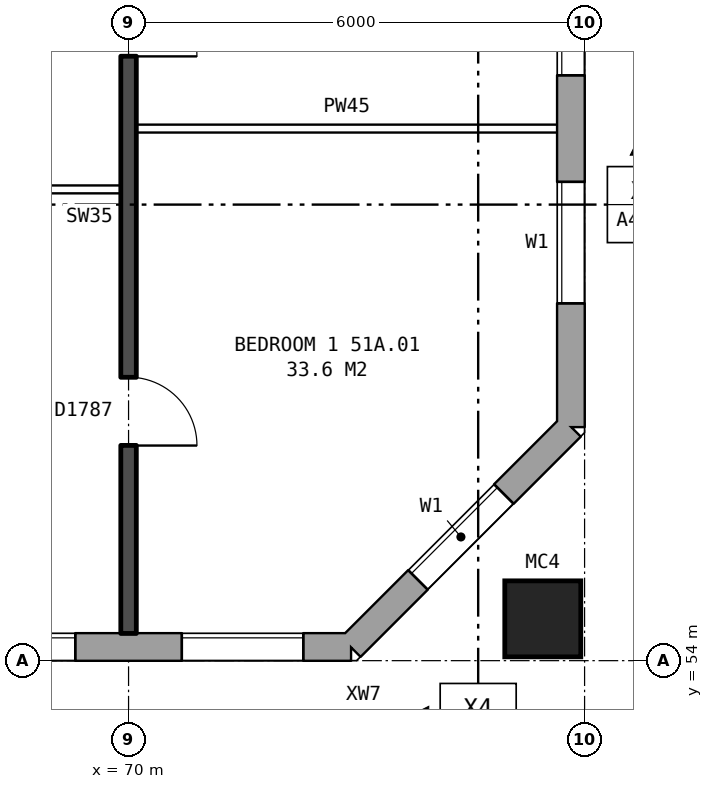
"""IFC4 building model, lengths in metres.
Left out: names, types, materials, properties, quantities, classifications, styles, units other than length and angle.
Written with IfcOpenShell. Run it as: python <this file> out.ifc"""

import sys

from ifc_helpers import new_model, si_unit, direction, frame, frame_2d, origin, origin_2d, place, context, subcontext, project, spatial, rectangle, hollow_rectangle, extrude, element, fill, save


model = new_model("IFC4")
c1 = context("Model", 3, precision=1e-05, world=origin(), true_north=direction((0.0, 1.0)))
c2 = subcontext(c1, "Body", "Model", "MODEL_VIEW")
j1 = project(units=[si_unit("LENGTHUNIT", "METRE"), si_unit("PLANEANGLEUNIT", "RADIAN")], contexts=[c1])
p1 = place(None, origin())
s1 = spatial("IfcSite", under=j1, at=p1, CompositionType="ELEMENT")
p2 = place(p1, origin())
s2 = spatial("IfcBuilding", under=s1, at=p2, CompositionType="ELEMENT")
p3 = place(p2, frame((0.0, 0.0, 182.0)))
s3 = spatial("IfcBuildingStorey", under=s2, at=p3, CompositionType="ELEMENT", Elevation=182.0)
p4 = place(p3, frame((75.45, 54.55, 0.0), z_axis=(0.0, 0.0, 1.0), x_axis=(1.0, 0.0, 0.0)))
e1 = element("IfcColumn", 1, at=p4, inside=s3, PredefinedType="COLUMN", context=c2, shape_type="SweptSolid", body=[
    extrude(hollow_rectangle(XDim=1.0, YDim=1.0, WallThickness=0.055, at=origin_2d()), origin(), (0.0, 0.0, 1.0), 3.1),
])
p5 = place(p3, frame((33.325, 54.18, 0.0), z_axis=(0.0, 0.0, 1.0), x_axis=(1.0, 0.0, 0.0)))
e2 = element("IfcWall", 2, at=p5, inside=s3, PredefinedType="STANDARD", context=c2, shape_type="SweptSolid", body=[
    extrude(rectangle(XDim=39.601, YDim=0.36, at=frame_2d((19.8, 0.0))), origin(), (0.0, 0.0, 1.0), 2.85),
])
p6 = place(p5, frame((1.375, 0.0, 0.8)))
e3 = element("IfcOpeningElement", 3, at=p6, cuts=e2, PredefinedType="OPENING", context=c2, shape_type="SweptSolid", body=[
    extrude(rectangle(XDim=1.6, YDim=1.8, at=frame_2d((0.8, 0.9))), frame((0.0, 0.19, 0.0), z_axis=(0.0, -1.0, 0.0), x_axis=(1.0, 0.0, 0.0)), (0.0, 0.0, 1.0), 0.38),
])
p7 = place(p5, frame((4.375, 0.0, 0.8)))
e4 = element("IfcOpeningElement", 4, at=p7, cuts=e2, PredefinedType="OPENING", context=c2, shape_type="SweptSolid", body=[
    extrude(rectangle(XDim=1.6, YDim=1.8, at=frame_2d((0.8, 0.9))), frame((0.0, 0.19, 0.0), z_axis=(0.0, -1.0, 0.0), x_axis=(1.0, 0.0, 0.0)), (0.0, 0.0, 1.0), 0.38),
])
p8 = place(p5, frame((6.875, 0.0, 0.8)))
e5 = element("IfcOpeningElement", 5, at=p8, cuts=e2, PredefinedType="OPENING", context=c2, shape_type="SweptSolid", body=[
    extrude(rectangle(XDim=1.0, YDim=1.8, at=frame_2d((0.5, 0.9))), frame((0.0, 0.19, 0.0), z_axis=(0.0, -1.0, 0.0), x_axis=(1.0, 0.0, 0.0)), (0.0, 0.0, 1.0), 0.38),
])
p9 = place(p5, frame((8.175, 0.0, 1.7)))
e6 = element("IfcOpeningElement", 6, at=p9, cuts=e2, PredefinedType="OPENING", context=c2, shape_type="SweptSolid", body=[
    extrude(rectangle(XDim=0.6, YDim=0.9, at=frame_2d((0.3, 0.45))), frame((0.0, 0.19, 0.0), z_axis=(0.0, -1.0, 0.0), x_axis=(1.0, 0.0, 0.0)), (0.0, 0.0, 1.0), 0.38),
])
p10 = place(p5, frame((13.375, 0.0, 0.8)))
e7 = element("IfcOpeningElement", 7, at=p10, cuts=e2, PredefinedType="OPENING", context=c2, shape_type="SweptSolid", body=[
    extrude(rectangle(XDim=1.6, YDim=1.8, at=frame_2d((0.8, 0.9))), frame((0.0, 0.19, 0.0), z_axis=(0.0, -1.0, 0.0), x_axis=(1.0, 0.0, 0.0)), (0.0, 0.0, 1.0), 0.38),
])
p11 = place(p5, frame((16.375, 0.0, 0.8)))
e8 = element("IfcOpeningElement", 8, at=p11, cuts=e2, PredefinedType="OPENING", context=c2, shape_type="SweptSolid", body=[
    extrude(rectangle(XDim=1.6, YDim=1.8, at=frame_2d((0.8, 0.9))), frame((0.0, 0.19, 0.0), z_axis=(0.0, -1.0, 0.0), x_axis=(1.0, 0.0, 0.0)), (0.0, 0.0, 1.0), 0.38),
])
p12 = place(p5, frame((19.375, 0.0, 0.8)))
e9 = element("IfcOpeningElement", 9, at=p12, cuts=e2, PredefinedType="OPENING", context=c2, shape_type="SweptSolid", body=[
    extrude(rectangle(XDim=1.6, YDim=1.8, at=frame_2d((0.8, 0.9))), frame((0.0, 0.19, 0.0), z_axis=(0.0, -1.0, 0.0), x_axis=(1.0, 0.0, 0.0)), (0.0, 0.0, 1.0), 0.38),
])
p13 = place(p5, frame((22.375, 0.0, 0.8)))
e10 = element("IfcOpeningElement", 10, at=p13, cuts=e2, PredefinedType="OPENING", context=c2, shape_type="SweptSolid", body=[
    extrude(rectangle(XDim=1.6, YDim=1.8, at=frame_2d((0.8, 0.9))), frame((0.0, 0.19, 0.0), z_axis=(0.0, -1.0, 0.0), x_axis=(1.0, 0.0, 0.0)), (0.0, 0.0, 1.0), 0.38),
])
p14 = place(p5, frame((25.375, 0.0, 0.8)))
e11 = element("IfcOpeningElement", 11, at=p14, cuts=e2, PredefinedType="OPENING", context=c2, shape_type="SweptSolid", body=[
    extrude(rectangle(XDim=1.6, YDim=1.8, at=frame_2d((0.8, 0.9))), frame((0.0, 0.19, 0.0), z_axis=(0.0, -1.0, 0.0), x_axis=(1.0, 0.0, 0.0)), (0.0, 0.0, 1.0), 0.38),
])
p15 = place(p5, frame((27.825, 0.0, 0.35)))
e12 = element("IfcOpeningElement", 12, at=p15, cuts=e2, PredefinedType="OPENING", context=c2, shape_type="SweptSolid", body=[
    extrude(rectangle(XDim=1.4, YDim=1.8, at=frame_2d((0.7, 0.9))), frame((0.0, 0.19, 0.0), z_axis=(0.0, -1.0, 0.0), x_axis=(1.0, 0.0, 0.0)), (0.0, 0.0, 1.0), 0.38),
])
p16 = place(p5, frame((31.375, 0.0, 0.8)))
e13 = element("IfcOpeningElement", 13, at=p16, cuts=e2, PredefinedType="OPENING", context=c2, shape_type="SweptSolid", body=[
    extrude(rectangle(XDim=1.6, YDim=1.8, at=frame_2d((0.8, 0.9))), frame((0.0, 0.19, 0.0), z_axis=(0.0, -1.0, 0.0), x_axis=(1.0, 0.0, 0.0)), (0.0, 0.0, 1.0), 0.38),
])
p17 = place(p5, frame((34.375, 0.0, 0.8)))
e14 = element("IfcOpeningElement", 14, at=p17, cuts=e2, PredefinedType="OPENING", context=c2, shape_type="SweptSolid", body=[
    extrude(rectangle(XDim=1.6, YDim=1.8, at=frame_2d((0.8, 0.9))), frame((0.0, 0.19, 0.0), z_axis=(0.0, -1.0, 0.0), x_axis=(1.0, 0.0, 0.0)), (0.0, 0.0, 1.0), 0.38),
])
p18 = place(p5, frame((37.375, 0.0, 0.8)))
e15 = element("IfcOpeningElement", 15, at=p18, cuts=e2, PredefinedType="OPENING", context=c2, shape_type="SweptSolid", body=[
    extrude(rectangle(XDim=1.6, YDim=1.8, at=frame_2d((0.8, 0.9))), frame((0.0, 0.19, 0.0), z_axis=(0.0, -1.0, 0.0), x_axis=(1.0, 0.0, 0.0)), (0.0, 0.0, 1.0), 0.38),
])
p19 = place(p5, frame((9.925, 0.0, 0.8)))
e16 = element("IfcOpeningElement", 16, at=p19, cuts=e2, PredefinedType="OPENING", context=c2, shape_type="SweptSolid", body=[
    extrude(rectangle(XDim=0.6, YDim=0.9, at=frame_2d((0.3, 0.45))), frame((0.0, 0.19, 0.0), z_axis=(0.0, -1.0, 0.0), x_axis=(1.0, 0.0, 0.0)), (0.0, 0.0, 1.0), 0.38),
])
p20 = place(p5, frame((10.875, 0.0, 0.8)))
e17 = element("IfcOpeningElement", 17, at=p20, cuts=e2, PredefinedType="OPENING", context=c2, shape_type="SweptSolid", body=[
    extrude(rectangle(XDim=1.6, YDim=1.8, at=frame_2d((0.8, 0.9))), frame((0.0, 0.19, 0.0), z_axis=(0.0, -1.0, 0.0), x_axis=(1.0, 0.0, 0.0)), (0.0, 0.0, 1.0), 0.38),
])
p21 = place(p5, frame((29.525, 0.0, 0.35)))
e18 = element("IfcOpeningElement", 18, at=p21, cuts=e2, PredefinedType="OPENING", context=c2, shape_type="SweptSolid", body=[
    extrude(rectangle(XDim=0.6, YDim=0.9, at=frame_2d((0.3, 0.45))), frame((0.0, 0.19, 0.0), z_axis=(0.0, -1.0, 0.0), x_axis=(1.0, 0.0, 0.0)), (0.0, 0.0, 1.0), 0.38),
])
p22 = place(p3, frame((72.925, 54.18, 0.0), z_axis=(0.0, 0.0, 1.0), x_axis=(0.707106781187, 0.707106781187, 0.0)))
e19 = element("IfcWall", 19, at=p22, inside=s3, PredefinedType="STANDARD", context=c2, shape_type="SweptSolid", body=[
    extrude(rectangle(XDim=4.094, YDim=0.36, at=frame_2d((2.047, 0.0))), origin(), (0.0, 0.0, 1.0), 2.85),
])
p23 = place(p22, frame((1.247, 0.0, 0.8)))
e20 = element("IfcOpeningElement", 20, at=p23, cuts=e19, PredefinedType="OPENING", context=c2, shape_type="SweptSolid", body=[
    extrude(rectangle(XDim=1.6, YDim=1.8, at=frame_2d((0.8, 0.9))), frame((0.0, 0.19, 0.0), z_axis=(0.0, -1.0, 0.0), x_axis=(1.0, 0.0, 0.0)), (0.0, 0.0, 1.0), 0.38),
])
p24 = place(p3, frame((75.82, 57.075, 0.0), z_axis=(0.0, 0.0, 1.0), x_axis=(0.0, 1.0, 0.0)))
e21 = element("IfcWall", 21, at=p24, inside=s3, PredefinedType="STANDARD", context=c2, shape_type="SweptSolid", body=[
    extrude(rectangle(XDim=25.851, YDim=0.36, at=frame_2d((12.925, 0.0))), origin(), (0.0, 0.0, 1.0), 2.85),
])
p25 = place(p24, frame((1.625, 0.0, 0.8)))
e22 = element("IfcOpeningElement", 22, at=p25, cuts=e21, PredefinedType="OPENING", context=c2, shape_type="SweptSolid", body=[
    extrude(rectangle(XDim=1.6, YDim=1.8, at=frame_2d((0.8, 0.9))), frame((0.0, 0.19, 0.0), z_axis=(0.0, -1.0, 0.0), x_axis=(1.0, 0.0, 0.0)), (0.0, 0.0, 1.0), 0.38),
])
p26 = place(p24, frame((4.625, 0.0, 0.8)))
e23 = element("IfcOpeningElement", 23, at=p26, cuts=e21, PredefinedType="OPENING", context=c2, shape_type="SweptSolid", body=[
    extrude(rectangle(XDim=1.6, YDim=1.8, at=frame_2d((0.8, 0.9))), frame((0.0, 0.19, 0.0), z_axis=(0.0, -1.0, 0.0), x_axis=(1.0, 0.0, 0.0)), (0.0, 0.0, 1.0), 0.38),
])
p27 = place(p24, frame((19.625, 0.0, 0.8)))
e24 = element("IfcOpeningElement", 24, at=p27, cuts=e21, PredefinedType="OPENING", context=c2, shape_type="SweptSolid", body=[
    extrude(rectangle(XDim=1.6, YDim=1.8, at=frame_2d((0.8, 0.9))), frame((0.0, 0.19, 0.0), z_axis=(0.0, -1.0, 0.0), x_axis=(1.0, 0.0, 0.0)), (0.0, 0.0, 1.0), 0.38),
])
p28 = place(p24, frame((22.625, 0.0, 0.8)))
e25 = element("IfcOpeningElement", 25, at=p28, cuts=e21, PredefinedType="OPENING", context=c2, shape_type="SweptSolid", body=[
    extrude(rectangle(XDim=1.6, YDim=1.8, at=frame_2d((0.8, 0.9))), frame((0.0, 0.19, 0.0), z_axis=(0.0, -1.0, 0.0), x_axis=(1.0, 0.0, 0.0)), (0.0, 0.0, 1.0), 0.38),
])
p29 = place(p3, frame((64.1, 60.2, 0.0), z_axis=(0.0, 0.0, 1.0), x_axis=(1.0, 0.0, 0.0)))
e26 = element("IfcWall", 26, at=p29, inside=s3, PredefinedType="PARTITIONING", context=c2, shape_type="SweptSolid", body=[
    extrude(rectangle(XDim=5.8, YDim=0.1, at=frame_2d((2.9, 0.0))), origin(), (0.0, 0.0, 1.0), 2.85),
])
p30 = place(p29, frame((3.6, 0.0, 0.0)))
e27 = element("IfcOpeningElement", 27, at=p30, cuts=e26, PredefinedType="OPENING", context=c2, shape_type="SweptSolid", body=[
    extrude(rectangle(XDim=0.9, YDim=2.1, at=frame_2d((0.45, 1.05))), frame((0.0, 0.06, 0.0), z_axis=(0.0, -1.0, 0.0), x_axis=(1.0, 0.0, 0.0)), (0.0, 0.0, 1.0), 0.12),
])
p31 = place(p29, frame((0.7, 0.0, 0.0)))
e28 = element("IfcOpeningElement", 28, at=p31, cuts=e26, PredefinedType="OPENING", context=c2, shape_type="SweptSolid", body=[
    extrude(rectangle(XDim=0.9, YDim=2.1, at=frame_2d((0.45, 1.05))), frame((0.0, 0.06, 0.0), z_axis=(0.0, -1.0, 0.0), x_axis=(1.0, 0.0, 0.0)), (0.0, 0.0, 1.0), 0.12),
])
p32 = place(p3, frame((70.1, 61.0, 0.0), z_axis=(0.0, 0.0, 1.0), x_axis=(1.0, 0.0, 0.0)))
e29 = element("IfcWall", 29, at=p32, inside=s3, PredefinedType="PARTITIONING", context=c2, shape_type="SweptSolid", body=[
    extrude(rectangle(XDim=5.54, YDim=0.1, at=frame_2d((2.77, 0.0))), origin(), (0.0, 0.0, 1.0), 2.85),
])
p33 = place(p3, frame((70.0, 54.36, 0.0), z_axis=(0.0, 0.0, 1.0), x_axis=(0.0, 1.0, 0.0)))
e30 = element("IfcWall", 30, at=p33, inside=s3, PredefinedType="SOLIDWALL", context=c2, shape_type="SweptSolid", body=[
    extrude(rectangle(XDim=9.44, YDim=0.2, at=frame_2d((4.72, 0.0))), origin(), (0.0, 0.0, 1.0), 2.85),
])
p34 = place(p33, frame((2.47, 0.0, 0.0)))
e31 = element("IfcOpeningElement", 31, at=p34, cuts=e30, PredefinedType="OPENING", context=c2, shape_type="SweptSolid", body=[
    extrude(rectangle(XDim=0.9, YDim=2.1, at=frame_2d((0.45, 1.05))), frame((0.0, 0.11, 0.0), z_axis=(0.0, -1.0, 0.0), x_axis=(1.0, 0.0, 0.0)), (0.0, 0.0, 1.0), 0.22),
])
p35 = place(p33, frame((7.59, 0.0, 0.0)))
e32 = element("IfcOpeningElement", 32, at=p35, cuts=e30, PredefinedType="OPENING", context=c2, shape_type="SweptSolid", body=[
    extrude(rectangle(XDim=0.9, YDim=2.1, at=frame_2d((0.45, 1.05))), frame((0.0, 0.11, 0.0), z_axis=(0.0, -1.0, 0.0), x_axis=(1.0, 0.0, 0.0)), (0.0, 0.0, 1.0), 0.22),
])
p36 = place(p17, origin())
e33 = element("IfcWindow", 33, at=p36, inside=s3, PartitioningType="SINGLE_PANEL", PredefinedType="WINDOW", context=c2, shape_type="SweptSolid", body=[
    extrude(rectangle(XDim=1.6, YDim=1.8, at=frame_2d((0.8, 0.9))), frame((0.0, 0.15, 0.0), z_axis=(0.0, -1.0, 0.0), x_axis=(1.0, 0.0, 0.0)), (0.0, 0.0, 1.0), 0.06),
])
fill(e14, e33)
p37 = place(p18, origin())
e34 = element("IfcWindow", 34, at=p37, inside=s3, PartitioningType="SINGLE_PANEL", PredefinedType="WINDOW", context=c2, shape_type="SweptSolid", body=[
    extrude(rectangle(XDim=1.6, YDim=1.8, at=frame_2d((0.8, 0.9))), frame((0.0, 0.15, 0.0), z_axis=(0.0, -1.0, 0.0), x_axis=(1.0, 0.0, 0.0)), (0.0, 0.0, 1.0), 0.06),
])
fill(e15, e34)
p38 = place(p23, origin())
e35 = element("IfcWindow", 35, at=p38, inside=s3, PartitioningType="SINGLE_PANEL", PredefinedType="WINDOW", context=c2, shape_type="SweptSolid", body=[
    extrude(rectangle(XDim=1.6, YDim=1.8, at=frame_2d((0.8, 0.9))), frame((0.0, 0.15, 0.0), z_axis=(0.0, -1.0, 0.0), x_axis=(1.0, 0.0, 0.0)), (0.0, 0.0, 1.0), 0.06),
])
fill(e20, e35)
p39 = place(p25, origin())
e36 = element("IfcWindow", 36, at=p39, inside=s3, PartitioningType="SINGLE_PANEL", PredefinedType="WINDOW", context=c2, shape_type="SweptSolid", body=[
    extrude(rectangle(XDim=1.6, YDim=1.8, at=frame_2d((0.8, 0.9))), frame((0.0, 0.15, 0.0), z_axis=(0.0, -1.0, 0.0), x_axis=(1.0, 0.0, 0.0)), (0.0, 0.0, 1.0), 0.06),
])
fill(e22, e36)
p40 = place(p26, origin())
e37 = element("IfcWindow", 37, at=p40, inside=s3, PartitioningType="SINGLE_PANEL", PredefinedType="WINDOW", context=c2, shape_type="SweptSolid", body=[
    extrude(rectangle(XDim=1.6, YDim=1.8, at=frame_2d((0.8, 0.9))), frame((0.0, 0.15, 0.0), z_axis=(0.0, -1.0, 0.0), x_axis=(1.0, 0.0, 0.0)), (0.0, 0.0, 1.0), 0.06),
])
fill(e23, e37)
p41 = place(p34, frame((0.9, 0.0, 0.0), z_axis=(0.0, 0.0, 1.0), x_axis=(-1.0, 0.0, 0.0)))
e38 = element("IfcDoor", 38, at=p41, inside=s3, OperationType="SINGLE_SWING_RIGHT", PredefinedType="DOOR", context=c2, shape_type="SweptSolid", body=[
    extrude(rectangle(XDim=0.9, YDim=2.1, at=frame_2d((0.45, 1.05))), frame((0.0, 0.025, 0.0), z_axis=(0.0, -1.0, 0.0), x_axis=(1.0, 0.0, 0.0)), (0.0, 0.0, 1.0), 0.05),
])
fill(e31, e38)
p42 = place(p35, frame((0.9, 0.0, 0.0), z_axis=(0.0, 0.0, 1.0), x_axis=(-1.0, 0.0, 0.0)))
e39 = element("IfcDoor", 39, at=p42, inside=s3, OperationType="SINGLE_SWING_RIGHT", PredefinedType="DOOR", context=c2, shape_type="SweptSolid", body=[
    extrude(rectangle(XDim=0.9, YDim=2.1, at=frame_2d((0.45, 1.05))), frame((0.0, 0.025, 0.0), z_axis=(0.0, -1.0, 0.0), x_axis=(1.0, 0.0, 0.0)), (0.0, 0.0, 1.0), 0.05),
])
fill(e32, e39)
save(model, sys.argv[1])
